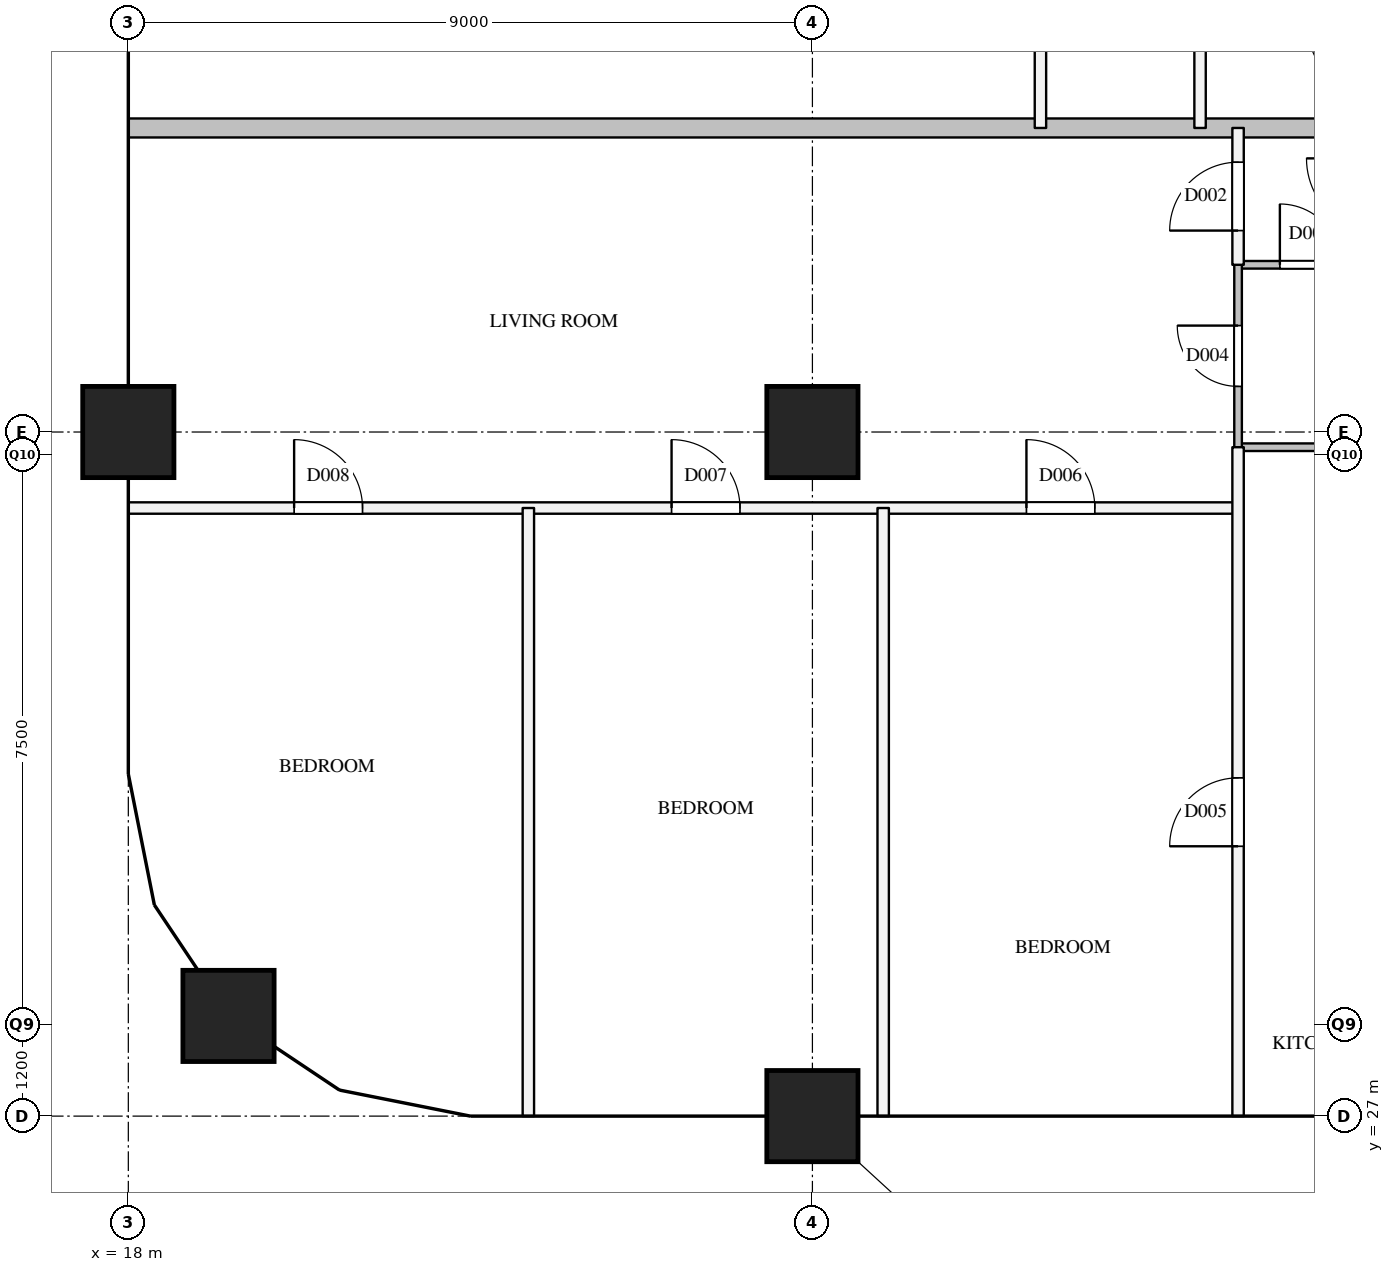
"""IFC4 building model, lengths in metres.
Left out: names, types, materials, properties, quantities, classifications, styles, units other than length and angle.
Written with IfcOpenShell. Run it as: python <this file> out.ifc"""

import sys

from ifc_helpers import new_model, si_unit, direction, frame, frame_2d, origin, origin_2d, place, context, subcontext, project, spatial, rectangle, extrude, element, fill, save


model = new_model("IFC4")
c1 = context("Model", 3, precision=1e-05, world=origin(), true_north=direction((0.0, 1.0)))
c2 = subcontext(c1, "Body", "Model", "MODEL_VIEW")
j1 = project(units=[si_unit("LENGTHUNIT", "METRE"), si_unit("PLANEANGLEUNIT", "RADIAN")], contexts=[c1])
p1 = place(None, origin())
s1 = spatial("IfcSite", under=j1, at=p1, CompositionType="ELEMENT")
p2 = place(p1, origin())
s2 = spatial("IfcBuilding", under=s1, at=p2, CompositionType="ELEMENT")
p3 = place(p2, frame((0.0, 0.0, 250.1)))
s3 = spatial("IfcBuildingStorey", under=s2, at=p3, CompositionType="ELEMENT", Elevation=250.1)
for number, where, z_axis, x_axis in (
    (1, (19.318, 28.318, 0.0), (0.0, 0.0, 1.0), (1.0, 0.0, 0.0)),
    (2, (18.0, 36.0, 0.0), (0.0, 0.0, 1.0), (1.0, 0.0, 0.0)),
    (3, (27.0, 27.0, 0.0), (0.0, 0.0, 1.0), (1.0, 0.0, 0.0)),
    (4, (27.0, 36.0, 0.0), (0.0, 0.0, 1.0), (1.0, 0.0, 0.0)),
):
    element("IfcColumn", number, at=place(p3, frame(where, z_axis=z_axis, x_axis=x_axis)), inside=s3, PredefinedType="COLUMN", context=c2, shape_type="SweptSolid", body=[
        extrude(rectangle(XDim=1.2, YDim=1.2, at=origin_2d()), origin(), (0.0, 0.0, 1.0), 3.9),
    ])
p4 = place(p3, frame((18.0, 35.0, 0.0), z_axis=(0.0, 0.0, 1.0), x_axis=(1.0, 0.0, 0.0)))
e5 = element("IfcWall", 5, at=p4, inside=s3, PredefinedType="PARTITIONING", context=c2, shape_type="SweptSolid", body=[
    extrude(rectangle(XDim=14.6, YDim=0.15, at=frame_2d((7.3, 0.0))), origin(), (0.0, 0.0, 1.0), 2.6),
])
p5 = place(p4, frame((11.816, 0.0, 0.0)))
e6 = element("IfcOpeningElement", 6, at=p5, cuts=e5, PredefinedType="OPENING", context=c2, shape_type="SweptSolid", body=[
    extrude(rectangle(XDim=0.9, YDim=2.1, at=frame_2d((0.45, 1.05))), frame((0.0, 0.085, 0.0), z_axis=(0.0, -1.0, 0.0), x_axis=(1.0, 0.0, 0.0)), (0.0, 0.0, 1.0), 0.17),
])
p6 = place(p4, frame((7.147, 0.0, 0.0)))
e7 = element("IfcOpeningElement", 7, at=p6, cuts=e5, PredefinedType="OPENING", context=c2, shape_type="SweptSolid", body=[
    extrude(rectangle(XDim=0.9, YDim=2.1, at=frame_2d((0.45, 1.05))), frame((0.0, 0.085, 0.0), z_axis=(0.0, -1.0, 0.0), x_axis=(1.0, 0.0, 0.0)), (0.0, 0.0, 1.0), 0.17),
])
p7 = place(p4, frame((2.181, 0.0, 0.0)))
e8 = element("IfcOpeningElement", 8, at=p7, cuts=e5, PredefinedType="OPENING", context=c2, shape_type="SweptSolid", body=[
    extrude(rectangle(XDim=0.9, YDim=2.1, at=frame_2d((0.45, 1.05))), frame((0.0, 0.085, 0.0), z_axis=(0.0, -1.0, 0.0), x_axis=(1.0, 0.0, 0.0)), (0.0, 0.0, 1.0), 0.17),
])
for number, where, z_axis, x_axis in (
    (9, (23.263, 27.0, 0.0), (0.0, 0.0, 1.0), (0.0, 1.0, 0.0)),
    (10, (27.931, 27.0, 0.0), (0.0, 0.0, 1.0), (0.0, 1.0, 0.0)),
):
    element("IfcWall", number, at=place(p3, frame(where, z_axis=z_axis, x_axis=x_axis)), inside=s3, PredefinedType="PARTITIONING", context=c2, shape_type="SweptSolid", body=[
        extrude(rectangle(XDim=8.0, YDim=0.15, at=frame_2d((4.0, 0.0))), origin(), (0.0, 0.0, 1.0), 2.6),
    ])
p8 = place(p3, frame((30.0, 40.0, 0.0), z_axis=(0.0, 0.0, 1.0), x_axis=(0.0, 1.0, 0.0)))
e11 = element("IfcWall", 11, at=p8, inside=s3, PredefinedType="PARTITIONING", context=c2, shape_type="SweptSolid", body=[
    extrude(rectangle(XDim=5.0, YDim=0.15, at=frame_2d((2.5, 0.0))), origin(), (0.0, 0.0, 1.0), 3.6),
])
p9 = place(p8, frame((2.05, 0.0, 0.0)))
e12 = element("IfcOpeningElement", 12, at=p9, cuts=e11, PredefinedType="OPENING", context=c2, shape_type="SweptSolid", body=[
    extrude(rectangle(XDim=0.9, YDim=2.1, at=frame_2d((0.45, 1.05))), frame((0.0, 0.085, 0.0), z_axis=(0.0, -1.0, 0.0), x_axis=(1.0, 0.0, 0.0)), (0.0, 0.0, 1.0), 0.17),
])
p10 = place(p3, frame((32.1, 40.0, 0.0), z_axis=(0.0, 0.0, 1.0), x_axis=(0.0, 1.0, 0.0)))
e13 = element("IfcWall", 13, at=p10, inside=s3, PredefinedType="PARTITIONING", context=c2, shape_type="SweptSolid", body=[
    extrude(rectangle(XDim=1.8, YDim=0.15, at=frame_2d((0.9, 0.0))), origin(), (0.0, 0.0, 1.0), 3.6),
])
p11 = place(p3, frame((32.6, 27.0, 0.0), z_axis=(0.0, 0.0, 1.0), x_axis=(0.0, 1.0, 0.0)))
e14 = element("IfcWall", 14, at=p11, inside=s3, PredefinedType="PARTITIONING", context=c2, shape_type="SweptSolid", body=[
    extrude(rectangle(XDim=8.8, YDim=0.15, at=frame_2d((4.4, 0.0))), origin(), (0.0, 0.0, 1.0), 2.6),
])
p12 = place(p11, frame((3.55, 0.0, 0.0)))
e15 = element("IfcOpeningElement", 15, at=p12, cuts=e14, PredefinedType="OPENING", context=c2, shape_type="SweptSolid", body=[
    extrude(rectangle(XDim=0.9, YDim=2.1, at=frame_2d((0.45, 1.05))), frame((0.0, 0.085, 0.0), z_axis=(0.0, -1.0, 0.0), x_axis=(1.0, 0.0, 0.0)), (0.0, 0.0, 1.0), 0.17),
])
p13 = place(p3, frame((32.6, 38.2, 0.0), z_axis=(0.0, 0.0, 1.0), x_axis=(0.0, 1.0, 0.0)))
e16 = element("IfcWall", 16, at=p13, inside=s3, PredefinedType="PARTITIONING", context=c2, shape_type="SweptSolid", body=[
    extrude(rectangle(XDim=1.8, YDim=0.15, at=frame_2d((0.9, 0.0))), origin(), (0.0, 0.0, 1.0), 3.6),
])
p14 = place(p13, frame((0.45, 0.0, 0.0)))
e17 = element("IfcOpeningElement", 17, at=p14, cuts=e16, PredefinedType="OPENING", context=c2, shape_type="SweptSolid", body=[
    extrude(rectangle(XDim=0.9, YDim=2.1, at=frame_2d((0.45, 1.05))), frame((0.0, 0.085, 0.0), z_axis=(0.0, -1.0, 0.0), x_axis=(1.0, 0.0, 0.0)), (0.0, 0.0, 1.0), 0.17),
])
p15 = place(p3, frame((18.0, 40.0, 0.0), z_axis=(0.0, 0.0, 1.0), x_axis=(1.0, 0.0, 0.0)))
e18 = element("IfcWall", 18, at=p15, inside=s3, PredefinedType="PARTITIONING", context=c2, shape_type="SweptSolid", body=[
    extrude(rectangle(XDim=16.5, YDim=0.25, at=frame_2d((8.25, 0.0))), origin(), (0.0, 0.0, 1.0), 2.6),
])
p16 = place(p3, frame((32.6, 35.8, 0.0), z_axis=(0.0, 0.0, 1.0), x_axis=(1.0, 0.0, 0.0)))
e19 = element("IfcWall", 19, at=p16, inside=s3, PredefinedType="PARTITIONING", context=c2, shape_type="SweptSolid", body=[
    extrude(rectangle(XDim=1.9, YDim=0.1, at=frame_2d((0.95, 0.0))), origin(), (0.0, 0.0, 1.0), 3.6),
])
p17 = place(p3, frame((32.6, 38.2, 0.0), z_axis=(0.0, 0.0, 1.0), x_axis=(1.0, 0.0, 0.0)))
e20 = element("IfcWall", 20, at=p17, inside=s3, PredefinedType="PARTITIONING", context=c2, shape_type="SweptSolid", body=[
    extrude(rectangle(XDim=1.9, YDim=0.1, at=frame_2d((0.95, 0.0))), origin(), (0.0, 0.0, 1.0), 3.6),
])
p18 = place(p17, frame((0.55, 0.0, 0.0)))
e21 = element("IfcOpeningElement", 21, at=p18, cuts=e20, PredefinedType="OPENING", context=c2, shape_type="SweptSolid", body=[
    extrude(rectangle(XDim=0.8, YDim=2.1, at=frame_2d((0.4, 1.05))), frame((0.0, 0.06, 0.0), z_axis=(0.0, -1.0, 0.0), x_axis=(1.0, 0.0, 0.0)), (0.0, 0.0, 1.0), 0.12),
])
p19 = place(p3, frame((32.6, 35.8, 0.0), z_axis=(0.0, 0.0, 1.0), x_axis=(0.0, 1.0, 0.0)))
e22 = element("IfcWall", 22, at=p19, inside=s3, PredefinedType="PARTITIONING", context=c2, shape_type="SweptSolid", body=[
    extrude(rectangle(XDim=2.4, YDim=0.1, at=frame_2d((1.2, 0.0))), origin(), (0.0, 0.0, 1.0), 3.6),
])
p20 = place(p19, frame((0.8, 0.0, 0.0)))
e23 = element("IfcOpeningElement", 23, at=p20, cuts=e22, PredefinedType="OPENING", context=c2, shape_type="SweptSolid", body=[
    extrude(rectangle(XDim=0.8, YDim=2.1, at=frame_2d((0.4, 1.05))), frame((0.0, 0.06, 0.0), z_axis=(0.0, -1.0, 0.0), x_axis=(1.0, 0.0, 0.0)), (0.0, 0.0, 1.0), 0.12),
])
p21 = place(p14, origin())
e24 = element("IfcDoor", 24, at=p21, inside=s3, OperationType="SINGLE_SWING_LEFT", PredefinedType="DOOR", context=c2, shape_type="SweptSolid", body=[
    extrude(rectangle(XDim=0.9, YDim=2.1, at=frame_2d((0.45, 1.05))), frame((0.0, 0.025, 0.0), z_axis=(0.0, -1.0, 0.0), x_axis=(1.0, 0.0, 0.0)), (0.0, 0.0, 1.0), 0.05),
])
fill(e17, e24)
p22 = place(p18, origin())
e25 = element("IfcDoor", 25, at=p22, inside=s3, OperationType="SINGLE_SWING_LEFT", PredefinedType="DOOR", context=c2, shape_type="SweptSolid", body=[
    extrude(rectangle(XDim=0.8, YDim=2.1, at=frame_2d((0.4, 1.05))), frame((0.0, 0.025, 0.0), z_axis=(0.0, -1.0, 0.0), x_axis=(1.0, 0.0, 0.0)), (0.0, 0.0, 1.0), 0.05),
])
fill(e21, e25)
p23 = place(p20, origin())
e26 = element("IfcDoor", 26, at=p23, inside=s3, OperationType="SINGLE_SWING_RIGHT", PredefinedType="DOOR", context=c2, shape_type="SweptSolid", body=[
    extrude(rectangle(XDim=0.8, YDim=2.1, at=frame_2d((0.4, 1.05))), frame((0.0, 0.025, 0.0), z_axis=(0.0, -1.0, 0.0), x_axis=(1.0, 0.0, 0.0)), (0.0, 0.0, 1.0), 0.05),
])
fill(e23, e26)
p24 = place(p12, origin())
e27 = element("IfcDoor", 27, at=p24, inside=s3, OperationType="SINGLE_SWING_LEFT", PredefinedType="DOOR", context=c2, shape_type="SweptSolid", body=[
    extrude(rectangle(XDim=0.9, YDim=2.1, at=frame_2d((0.45, 1.05))), frame((0.0, 0.025, 0.0), z_axis=(0.0, -1.0, 0.0), x_axis=(1.0, 0.0, 0.0)), (0.0, 0.0, 1.0), 0.05),
])
fill(e15, e27)
p25 = place(p5, origin())
e28 = element("IfcDoor", 28, at=p25, inside=s3, OperationType="SINGLE_SWING_LEFT", PredefinedType="DOOR", context=c2, shape_type="SweptSolid", body=[
    extrude(rectangle(XDim=0.9, YDim=2.1, at=frame_2d((0.45, 1.05))), frame((0.0, 0.025, 0.0), z_axis=(0.0, -1.0, 0.0), x_axis=(1.0, 0.0, 0.0)), (0.0, 0.0, 1.0), 0.05),
])
fill(e6, e28)
p26 = place(p6, origin())
e29 = element("IfcDoor", 29, at=p26, inside=s3, OperationType="SINGLE_SWING_LEFT", PredefinedType="DOOR", context=c2, shape_type="SweptSolid", body=[
    extrude(rectangle(XDim=0.9, YDim=2.1, at=frame_2d((0.45, 1.05))), frame((0.0, 0.025, 0.0), z_axis=(0.0, -1.0, 0.0), x_axis=(1.0, 0.0, 0.0)), (0.0, 0.0, 1.0), 0.05),
])
fill(e7, e29)
p27 = place(p7, origin())
e30 = element("IfcDoor", 30, at=p27, inside=s3, OperationType="SINGLE_SWING_LEFT", PredefinedType="DOOR", context=c2, shape_type="SweptSolid", body=[
    extrude(rectangle(XDim=0.9, YDim=2.1, at=frame_2d((0.45, 1.05))), frame((0.0, 0.025, 0.0), z_axis=(0.0, -1.0, 0.0), x_axis=(1.0, 0.0, 0.0)), (0.0, 0.0, 1.0), 0.05),
])
fill(e8, e30)
save(model, sys.argv[1])
